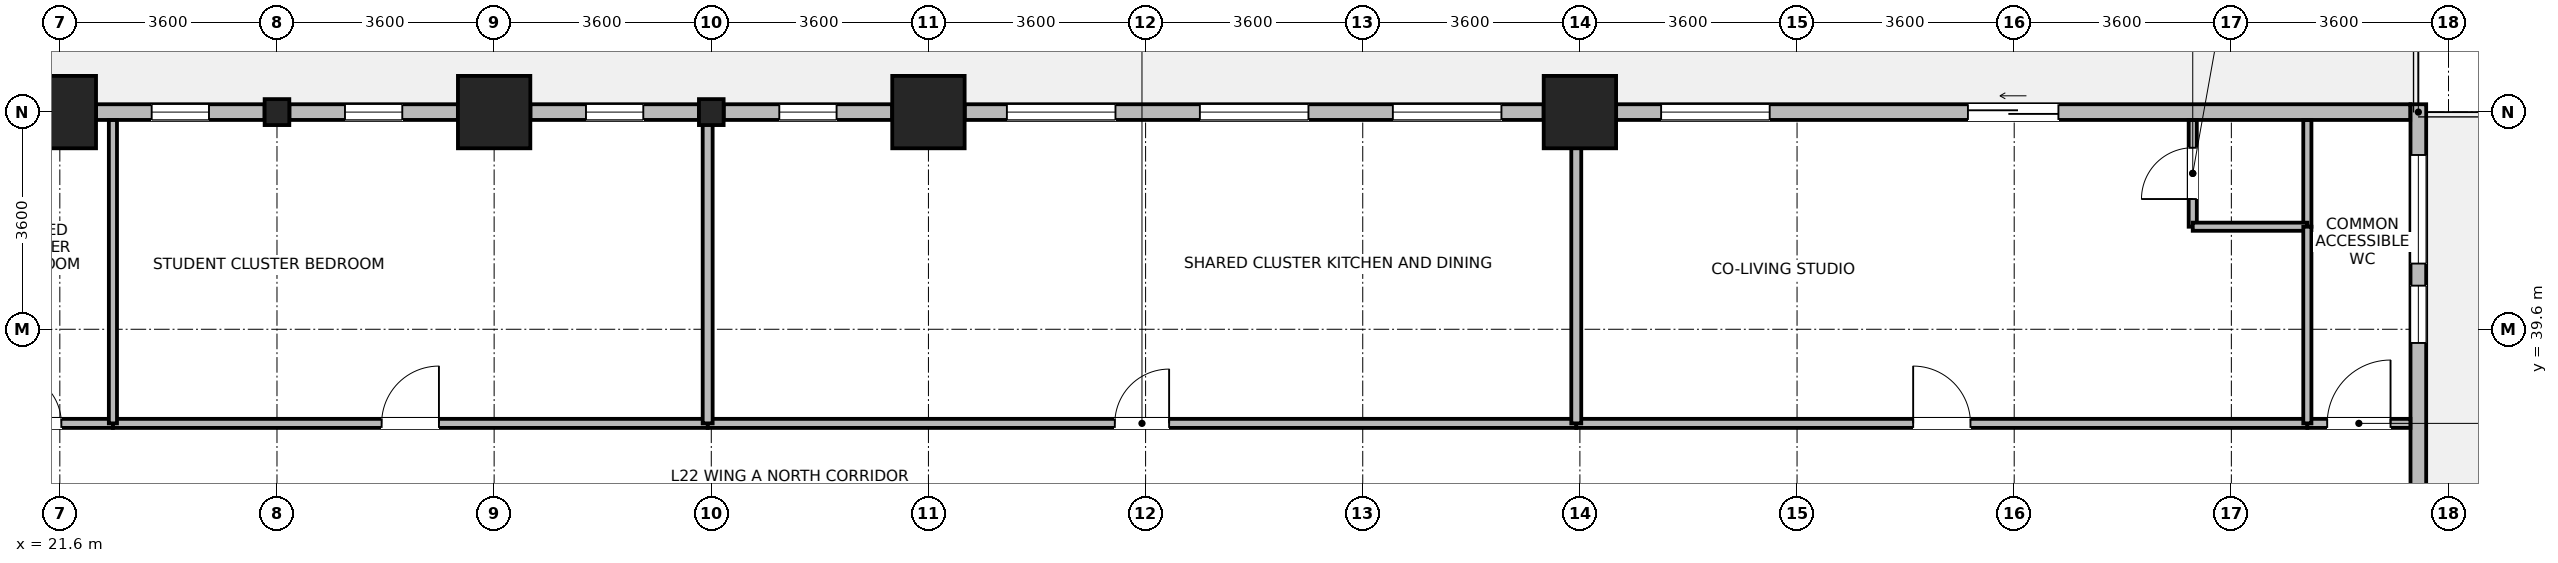
"""IFC4 building model, lengths in metres.
Left out: names, types, materials, properties, quantities, classifications, styles, units other than length and angle.
Written with IfcOpenShell. Run it as: python <this file> out.ifc"""

import sys

from ifc_helpers import new_model, si_unit, direction, frame, frame_2d, origin, origin_2d, place, context, subcontext, project, spatial, rectangle, i_section, extrude, source, transform, mapped, element, fill, save


model = new_model("IFC4")
c1 = context("Model", 3, precision=1e-05, world=origin(), true_north=direction((0.0, 1.0)))
c2 = subcontext(c1, "Body", "Model", "MODEL_VIEW")
j1 = project(units=[si_unit("LENGTHUNIT", "METRE"), si_unit("PLANEANGLEUNIT", "RADIAN")], contexts=[c1])
p1 = place(None, origin())
s1 = spatial("IfcSite", under=j1, at=p1, CompositionType="ELEMENT")
p2 = place(p1, origin())
s2 = spatial("IfcBuilding", under=s1, at=p2, CompositionType="ELEMENT")
p3 = place(p2, frame((0.0, 0.0, 89.7)))
s3 = spatial("IfcBuildingStorey", under=s2, at=p3, CompositionType="ELEMENT", Elevation=89.7)
m1 = source(origin(), c2, "Body", "SweptSolid", [
    extrude(rectangle(XDim=1.2, YDim=1.2, at=origin_2d()), origin(), (0.0, 0.0, 1.0), 3.7),
])
for number, where, z_axis, x_axis in (
    (1, (21.6, 43.2, 0.0), (0.0, 0.0, 1.0), (1.0, 0.0, 0.0)),
    (2, (28.8, 43.2, 0.0), (0.0, 0.0, 1.0), (1.0, 0.0, 0.0)),
    (3, (36.0, 43.2, 0.0), (0.0, 0.0, 1.0), (1.0, 0.0, 0.0)),
    (4, (46.8, 43.2, 0.0), (0.0, 0.0, 1.0), (1.0, 0.0, 0.0)),
):
    element("IfcColumn", number, at=place(p3, frame(where, z_axis=z_axis, x_axis=x_axis)), inside=s3, PredefinedType="COLUMN", context=c2, shape_type="MappedRepresentation", body=[
        mapped(m1, transform((0.0, 0.0, 0.0), x_axis=(1.0, 0.0, 0.0), y_axis=(0.0, 1.0, 0.0), z_axis=(0.0, 0.0, 1.0), scale=1.0)),
    ])
m2 = source(origin(), c2, "Body", "SweptSolid", [
    extrude(i_section(OverallWidth=0.409, OverallDepth=0.43, WebThickness=0.024, FlangeThickness=0.033, FilletRadius=0.015, at=origin_2d()), origin(), (0.0, 0.0, 1.0), 3.7),
])
for number, where, z_axis, x_axis in (
    (5, (25.2, 43.2, 0.0), (0.0, 0.0, 1.0), (1.0, 0.0, 0.0)),
    (6, (32.4, 43.2, 0.0), (0.0, 0.0, 1.0), (1.0, 0.0, 0.0)),
):
    element("IfcColumn", number, at=place(p3, frame(where, z_axis=z_axis, x_axis=x_axis)), inside=s3, PredefinedType="COLUMN", context=c2, shape_type="MappedRepresentation", body=[
        mapped(m2, transform((0.0, 0.0, 0.0), x_axis=(1.0, 0.0, 0.0), y_axis=(0.0, 1.0, 0.0), z_axis=(0.0, 0.0, 1.0), scale=1.0)),
    ])
p4 = place(p3, frame((60.7, 43.33, 0.0), z_axis=(0.0, 0.0, 1.0), x_axis=(0.0, -1.0, 0.0)))
e7 = element("IfcWall", 7, at=p4, inside=s3, PredefinedType="STANDARD", context=c2, shape_type="SweptSolid", body=[
    extrude(rectangle(XDim=6.964, YDim=0.26, at=frame_2d((3.482, 0.0))), origin(), (0.0, 0.0, 1.0), 3.43),
])
p5 = place(p4, frame((0.841, 0.0, 0.85)))
e8 = element("IfcOpeningElement", 8, at=p5, cuts=e7, PredefinedType="OPENING", context=c2, shape_type="SweptSolid", body=[
    extrude(rectangle(XDim=1.8, YDim=1.85, at=frame_2d((0.9, 0.925))), frame((0.0, 0.14, 0.0), z_axis=(0.0, -1.0, 0.0), x_axis=(1.0, 0.0, 0.0)), (0.0, 0.0, 1.0), 0.28),
])
p6 = place(p4, frame((3.007, 0.0, 0.85)))
e9 = element("IfcOpeningElement", 9, at=p6, cuts=e7, PredefinedType="OPENING", context=c2, shape_type="SweptSolid", body=[
    extrude(rectangle(XDim=0.95, YDim=1.75, at=frame_2d((0.475, 0.875))), frame((0.0, 0.14, 0.0), z_axis=(0.0, -1.0, 0.0), x_axis=(1.0, 0.0, 0.0)), (0.0, 0.0, 1.0), 0.28),
])
p7 = place(p3, frame((47.401, 43.2, 0.0), z_axis=(0.0, 0.0, 1.0), x_axis=(1.0, 0.0, 0.0)))
e10 = element("IfcWall", 10, at=p7, inside=s3, PredefinedType="STANDARD", context=c2, shape_type="SweptSolid", body=[
    extrude(rectangle(XDim=13.164, YDim=0.26, at=frame_2d((6.582, 0.0))), origin(), (0.0, 0.0, 1.0), 3.43),
])
p8 = place(p7, frame((5.832, 0.0, 0.0)))
e11 = element("IfcOpeningElement", 11, at=p8, cuts=e10, PredefinedType="OPENING", context=c2, shape_type="SweptSolid", body=[
    extrude(rectangle(XDim=1.5, YDim=2.15, at=frame_2d((0.75, 1.075))), frame((0.0, 0.14, 0.0), z_axis=(0.0, -1.0, 0.0), x_axis=(1.0, 0.0, 0.0)), (0.0, 0.0, 1.0), 0.28),
])
p9 = place(p7, frame((0.746, 0.0, 0.85)))
e12 = element("IfcOpeningElement", 12, at=p9, cuts=e10, PredefinedType="OPENING", context=c2, shape_type="SweptSolid", body=[
    extrude(rectangle(XDim=1.8, YDim=1.85, at=frame_2d((0.9, 0.925))), frame((0.0, 0.14, 0.0), z_axis=(0.0, -1.0, 0.0), x_axis=(1.0, 0.0, 0.0)), (0.0, 0.0, 1.0), 0.28),
])
p10 = place(p3, frame((36.601, 43.2, 0.0), z_axis=(0.0, 0.0, 1.0), x_axis=(1.0, 0.0, 0.0)))
e13 = element("IfcWall", 13, at=p10, inside=s3, PredefinedType="STANDARD", context=c2, shape_type="SweptSolid", body=[
    extrude(rectangle(XDim=9.598, YDim=0.26, at=frame_2d((4.799, 0.0))), origin(), (0.0, 0.0, 1.0), 2.93),
])
p11 = place(p10, frame((0.7, 0.0, 0.85)))
e14 = element("IfcOpeningElement", 14, at=p11, cuts=e13, PredefinedType="OPENING", context=c2, shape_type="SweptSolid", body=[
    extrude(rectangle(XDim=1.8, YDim=1.85, at=frame_2d((0.9, 0.925))), frame((0.0, 0.14, 0.0), z_axis=(0.0, -1.0, 0.0), x_axis=(1.0, 0.0, 0.0)), (0.0, 0.0, 1.0), 0.28),
])
p12 = place(p10, frame((3.899, 0.0, 0.85)))
e15 = element("IfcOpeningElement", 15, at=p12, cuts=e13, PredefinedType="OPENING", context=c2, shape_type="SweptSolid", body=[
    extrude(rectangle(XDim=1.8, YDim=1.85, at=frame_2d((0.9, 0.925))), frame((0.0, 0.14, 0.0), z_axis=(0.0, -1.0, 0.0), x_axis=(1.0, 0.0, 0.0)), (0.0, 0.0, 1.0), 0.28),
])
p13 = place(p10, frame((7.098, 0.0, 0.85)))
e16 = element("IfcOpeningElement", 16, at=p13, cuts=e13, PredefinedType="OPENING", context=c2, shape_type="SweptSolid", body=[
    extrude(rectangle(XDim=1.8, YDim=1.85, at=frame_2d((0.9, 0.925))), frame((0.0, 0.14, 0.0), z_axis=(0.0, -1.0, 0.0), x_axis=(1.0, 0.0, 0.0)), (0.0, 0.0, 1.0), 0.28),
])
p14 = place(p3, frame((32.605, 43.2, 0.0), z_axis=(0.0, 0.0, 1.0), x_axis=(1.0, 0.0, 0.0)))
e17 = element("IfcWall", 17, at=p14, inside=s3, PredefinedType="STANDARD", context=c2, shape_type="SweptSolid", body=[
    extrude(rectangle(XDim=2.793, YDim=0.26, at=frame_2d((1.397, 0.0))), origin(), (0.0, 0.0, 1.0), 2.93),
])
p15 = place(p14, frame((0.922, 0.0, 0.85)))
e18 = element("IfcOpeningElement", 18, at=p15, cuts=e17, PredefinedType="OPENING", context=c2, shape_type="SweptSolid", body=[
    extrude(rectangle(XDim=0.95, YDim=1.75, at=frame_2d((0.475, 0.875))), frame((0.0, 0.14, 0.0), z_axis=(0.0, -1.0, 0.0), x_axis=(1.0, 0.0, 0.0)), (0.0, 0.0, 1.0), 0.28),
])
p16 = place(p3, frame((29.401, 43.2, 0.0), z_axis=(0.0, 0.0, 1.0), x_axis=(1.0, 0.0, 0.0)))
e19 = element("IfcWall", 19, at=p16, inside=s3, PredefinedType="STANDARD", context=c2, shape_type="SweptSolid", body=[
    extrude(rectangle(XDim=2.794, YDim=0.26, at=frame_2d((1.397, 0.0))), origin(), (0.0, 0.0, 1.0), 2.93),
])
p17 = place(p16, frame((0.922, 0.0, 0.85)))
e20 = element("IfcOpeningElement", 20, at=p17, cuts=e19, PredefinedType="OPENING", context=c2, shape_type="SweptSolid", body=[
    extrude(rectangle(XDim=0.95, YDim=1.75, at=frame_2d((0.475, 0.875))), frame((0.0, 0.14, 0.0), z_axis=(0.0, -1.0, 0.0), x_axis=(1.0, 0.0, 0.0)), (0.0, 0.0, 1.0), 0.28),
])
p18 = place(p3, frame((25.406, 43.2, 0.0), z_axis=(0.0, 0.0, 1.0), x_axis=(1.0, 0.0, 0.0)))
e21 = element("IfcWall", 21, at=p18, inside=s3, PredefinedType="STANDARD", context=c2, shape_type="SweptSolid", body=[
    extrude(rectangle(XDim=2.793, YDim=0.26, at=frame_2d((1.397, 0.0))), origin(), (0.0, 0.0, 1.0), 2.93),
])
p19 = place(p18, frame((0.922, 0.0, 0.85)))
e22 = element("IfcOpeningElement", 22, at=p19, cuts=e21, PredefinedType="OPENING", context=c2, shape_type="SweptSolid", body=[
    extrude(rectangle(XDim=0.95, YDim=1.75, at=frame_2d((0.475, 0.875))), frame((0.0, 0.14, 0.0), z_axis=(0.0, -1.0, 0.0), x_axis=(1.0, 0.0, 0.0)), (0.0, 0.0, 1.0), 0.28),
])
p20 = place(p3, frame((22.201, 43.2, 0.0), z_axis=(0.0, 0.0, 1.0), x_axis=(1.0, 0.0, 0.0)))
e23 = element("IfcWall", 23, at=p20, inside=s3, PredefinedType="STANDARD", context=c2, shape_type="SweptSolid", body=[
    extrude(rectangle(XDim=2.793, YDim=0.26, at=frame_2d((1.397, 0.0))), origin(), (0.0, 0.0, 1.0), 2.93),
])
p21 = place(p20, frame((0.922, 0.0, 0.85)))
e24 = element("IfcOpeningElement", 24, at=p21, cuts=e23, PredefinedType="OPENING", context=c2, shape_type="SweptSolid", body=[
    extrude(rectangle(XDim=0.95, YDim=1.75, at=frame_2d((0.475, 0.875))), frame((0.0, 0.14, 0.0), z_axis=(0.0, -1.0, 0.0), x_axis=(1.0, 0.0, 0.0)), (0.0, 0.0, 1.0), 0.28),
])
p22 = place(p3, frame((56.96, 41.3, 0.0), z_axis=(0.0, 0.0, 1.0), x_axis=(0.0, 1.0, 0.0)))
e25 = element("IfcWall", 25, at=p22, inside=s3, PredefinedType="PARTITIONING", context=c2, shape_type="SweptSolid", body=[
    extrude(rectangle(XDim=1.768, YDim=0.135, at=frame_2d((0.884, 0.0))), origin(), (0.0, 0.0, 1.0), 3.43),
])
p23 = place(p22, frame((0.459, 0.0, 0.0)))
e26 = element("IfcOpeningElement", 26, at=p23, cuts=e25, PredefinedType="OPENING", context=c2, shape_type="SweptSolid", body=[
    extrude(rectangle(XDim=0.85, YDim=2.04, at=frame_2d((0.425, 1.02))), frame((0.0, 0.078, 0.0), z_axis=(0.0, -1.0, 0.0), x_axis=(1.0, 0.0, 0.0)), (0.0, 0.0, 1.0), 0.155),
])
p24 = place(p3, frame((58.86, 41.3, 0.0), z_axis=(0.0, 0.0, 1.0), x_axis=(0.0, 1.0, 0.0)))
e27 = element("IfcWall", 27, at=p24, inside=s3, PredefinedType="PARTITIONING", context=c2, shape_type="SweptSolid", body=[
    extrude(rectangle(XDim=1.768, YDim=0.135, at=frame_2d((0.884, 0.0))), origin(), (0.0, 0.0, 1.0), 3.43),
])
p25 = place(p3, frame((56.96, 41.3, 0.0), z_axis=(0.0, 0.0, 1.0), x_axis=(1.0, 0.0, 0.0)))
e28 = element("IfcWall", 28, at=p25, inside=s3, PredefinedType="PARTITIONING", context=c2, shape_type="SweptSolid", body=[
    extrude(rectangle(XDim=1.9, YDim=0.135, at=frame_2d((0.95, 0.0))), origin(), (0.0, 0.0, 1.0), 3.43),
])
p26 = place(p3, frame((32.34, 38.04, 0.0), z_axis=(0.0, 0.0, 1.0), x_axis=(1.0, 0.0, 0.0)))
e29 = element("IfcWall", 29, at=p26, inside=s3, PredefinedType="PARTITIONING", context=c2, shape_type="SweptSolid", body=[
    extrude(rectangle(XDim=14.4, YDim=0.15, at=frame_2d((7.2, 0.0))), origin(), (0.0, 0.0, 1.0), 3.43),
])
p27 = place(p26, frame((6.75, 0.0, 0.0)))
e30 = element("IfcOpeningElement", 30, at=p27, cuts=e29, PredefinedType="OPENING", context=c2, shape_type="SweptSolid", body=[
    extrude(rectangle(XDim=0.9, YDim=2.08, at=frame_2d((0.45, 1.04))), frame((0.0, 0.085, 0.0), z_axis=(0.0, -1.0, 0.0), x_axis=(1.0, 0.0, 0.0)), (0.0, 0.0, 1.0), 0.17),
])
p28 = place(p3, frame((46.74, 38.04, 0.0), z_axis=(0.0, 0.0, 1.0), x_axis=(1.0, 0.0, 0.0)))
e31 = element("IfcWall", 31, at=p28, inside=s3, PredefinedType="PARTITIONING", context=c2, shape_type="SweptSolid", body=[
    extrude(rectangle(XDim=12.12, YDim=0.15, at=frame_2d((6.06, 0.0))), origin(), (0.0, 0.0, 1.0), 3.43),
])
p29 = place(p28, frame((5.585, 0.0, 0.0)))
e32 = element("IfcOpeningElement", 32, at=p29, cuts=e31, PredefinedType="OPENING", context=c2, shape_type="SweptSolid", body=[
    extrude(rectangle(XDim=0.95, YDim=2.1, at=frame_2d((0.475, 1.05))), frame((0.0, 0.085, 0.0), z_axis=(0.0, -1.0, 0.0), x_axis=(1.0, 0.0, 0.0)), (0.0, 0.0, 1.0), 0.17),
])
p30 = place(p3, frame((22.48, 38.04, 0.0), z_axis=(0.0, 0.0, 1.0), x_axis=(1.0, 0.0, 0.0)))
e33 = element("IfcWall", 33, at=p30, inside=s3, PredefinedType="PARTITIONING", context=c2, shape_type="SweptSolid", body=[
    extrude(rectangle(XDim=9.86, YDim=0.15, at=frame_2d((4.93, 0.0))), origin(), (0.0, 0.0, 1.0), 3.43),
])
p31 = place(p30, frame((4.455, 0.0, 0.0)))
e34 = element("IfcOpeningElement", 34, at=p31, cuts=e33, PredefinedType="OPENING", context=c2, shape_type="SweptSolid", body=[
    extrude(rectangle(XDim=0.95, YDim=2.1, at=frame_2d((0.475, 1.05))), frame((0.0, 0.085, 0.0), z_axis=(0.0, -1.0, 0.0), x_axis=(1.0, 0.0, 0.0)), (0.0, 0.0, 1.0), 0.17),
])
p32 = place(p3, frame((19.92, 38.04, 0.0), z_axis=(0.0, 0.0, 1.0), x_axis=(1.0, 0.0, 0.0)))
e35 = element("IfcWall", 35, at=p32, inside=s3, PredefinedType="PARTITIONING", context=c2, shape_type="SweptSolid", body=[
    extrude(rectangle(XDim=2.56, YDim=0.15, at=frame_2d((1.28, 0.0))), origin(), (0.0, 0.0, 1.0), 3.43),
])
p33 = place(p32, frame((0.855, 0.0, 0.0)))
e36 = element("IfcOpeningElement", 36, at=p33, cuts=e35, PredefinedType="OPENING", context=c2, shape_type="SweptSolid", body=[
    extrude(rectangle(XDim=0.85, YDim=2.04, at=frame_2d((0.425, 1.02))), frame((0.0, 0.085, 0.0), z_axis=(0.0, -1.0, 0.0), x_axis=(1.0, 0.0, 0.0)), (0.0, 0.0, 1.0), 0.17),
])
p34 = place(p3, frame((58.86, 38.04, 0.0), z_axis=(0.0, 0.0, 1.0), x_axis=(1.0, 0.0, 0.0)))
e37 = element("IfcWall", 37, at=p34, inside=s3, PredefinedType="PARTITIONING", context=c2, shape_type="SweptSolid", body=[
    extrude(rectangle(XDim=1.708, YDim=0.15, at=frame_2d((0.854, 0.0))), origin(), (0.0, 0.0, 1.0), 3.43),
])
p35 = place(p34, frame((0.329, 0.0, 0.0)))
e38 = element("IfcOpeningElement", 38, at=p35, cuts=e37, PredefinedType="OPENING", context=c2, shape_type="SweptSolid", body=[
    extrude(rectangle(XDim=1.05, YDim=2.12, at=frame_2d((0.525, 1.06))), frame((0.0, 0.085, 0.0), z_axis=(0.0, -1.0, 0.0), x_axis=(1.0, 0.0, 0.0)), (0.0, 0.0, 1.0), 0.17),
])
p36 = place(p3, frame((22.48, 38.04, 0.0), z_axis=(0.0, 0.0, 1.0), x_axis=(0.0, 1.0, 0.0)))
e39 = element("IfcWall", 39, at=p36, inside=s3, PredefinedType="PARTITIONING", context=c2, shape_type="SweptSolid", body=[
    extrude(rectangle(XDim=5.028, YDim=0.135, at=frame_2d((2.514, 0.0))), origin(), (0.0, 0.0, 1.0), 3.43),
])
p37 = place(p3, frame((32.34, 38.04, 0.0), z_axis=(0.0, 0.0, 1.0), x_axis=(0.0, 1.0, 0.0)))
e40 = element("IfcWall", 40, at=p37, inside=s3, PredefinedType="PARTITIONING", context=c2, shape_type="SweptSolid", body=[
    extrude(rectangle(XDim=5.028, YDim=0.165, at=frame_2d((2.514, 0.0))), origin(), (0.0, 0.0, 1.0), 3.07),
])
p38 = place(p3, frame((46.74, 38.04, 0.0), z_axis=(0.0, 0.0, 1.0), x_axis=(0.0, 1.0, 0.0)))
e41 = element("IfcWall", 41, at=p38, inside=s3, PredefinedType="PARTITIONING", context=c2, shape_type="SweptSolid", body=[
    extrude(rectangle(XDim=5.028, YDim=0.165, at=frame_2d((2.514, 0.0))), origin(), (0.0, 0.0, 1.0), 2.93),
])
p39 = place(p3, frame((58.86, 38.04, 0.0), z_axis=(0.0, 0.0, 1.0), x_axis=(0.0, 1.0, 0.0)))
e42 = element("IfcWall", 42, at=p39, inside=s3, PredefinedType="PARTITIONING", context=c2, shape_type="SweptSolid", body=[
    extrude(rectangle(XDim=3.26, YDim=0.135, at=frame_2d((1.63, 0.0))), origin(), (0.0, 0.0, 1.0), 3.43),
])
p40 = place(p5, origin())
e43 = element("IfcWindow", 43, at=p40, inside=s3, PartitioningType="SINGLE_PANEL", PredefinedType="WINDOW", context=c2, shape_type="SweptSolid", body=[
    extrude(rectangle(XDim=1.8, YDim=1.85, at=frame_2d((0.9, 0.925))), frame((0.0, 0.03, 0.0), z_axis=(0.0, -1.0, 0.0), x_axis=(1.0, 0.0, 0.0)), (0.0, 0.0, 1.0), 0.06),
])
fill(e8, e43)
p41 = place(p6, origin())
e44 = element("IfcWindow", 44, at=p41, inside=s3, PartitioningType="SINGLE_PANEL", PredefinedType="WINDOW", context=c2, shape_type="SweptSolid", body=[
    extrude(rectangle(XDim=0.95, YDim=1.75, at=frame_2d((0.475, 0.875))), frame((0.0, 0.03, 0.0), z_axis=(0.0, -1.0, 0.0), x_axis=(1.0, 0.0, 0.0)), (0.0, 0.0, 1.0), 0.06),
])
fill(e9, e44)
p42 = place(p8, origin())
e45 = element("IfcDoor", 45, at=p42, inside=s3, OperationType="SLIDING_TO_LEFT", PredefinedType="DOOR", context=c2, shape_type="SweptSolid", body=[
    extrude(rectangle(XDim=1.5, YDim=2.15, at=frame_2d((0.75, 1.075))), frame((0.0, 0.025, 0.0), z_axis=(0.0, -1.0, 0.0), x_axis=(1.0, 0.0, 0.0)), (0.0, 0.0, 1.0), 0.05),
])
fill(e11, e45)
p43 = place(p9, origin())
e46 = element("IfcWindow", 46, at=p43, inside=s3, PartitioningType="SINGLE_PANEL", PredefinedType="WINDOW", context=c2, shape_type="SweptSolid", body=[
    extrude(rectangle(XDim=1.8, YDim=1.85, at=frame_2d((0.9, 0.925))), frame((0.0, 0.03, 0.0), z_axis=(0.0, -1.0, 0.0), x_axis=(1.0, 0.0, 0.0)), (0.0, 0.0, 1.0), 0.06),
])
fill(e12, e46)
p44 = place(p11, origin())
e47 = element("IfcWindow", 47, at=p44, inside=s3, PartitioningType="SINGLE_PANEL", PredefinedType="WINDOW", context=c2, shape_type="SweptSolid", body=[
    extrude(rectangle(XDim=1.8, YDim=1.85, at=frame_2d((0.9, 0.925))), frame((0.0, 0.03, 0.0), z_axis=(0.0, -1.0, 0.0), x_axis=(1.0, 0.0, 0.0)), (0.0, 0.0, 1.0), 0.06),
])
fill(e14, e47)
p45 = place(p12, origin())
e48 = element("IfcWindow", 48, at=p45, inside=s3, PartitioningType="SINGLE_PANEL", PredefinedType="WINDOW", context=c2, shape_type="SweptSolid", body=[
    extrude(rectangle(XDim=1.8, YDim=1.85, at=frame_2d((0.9, 0.925))), frame((0.0, 0.03, 0.0), z_axis=(0.0, -1.0, 0.0), x_axis=(1.0, 0.0, 0.0)), (0.0, 0.0, 1.0), 0.06),
])
fill(e15, e48)
p46 = place(p13, origin())
e49 = element("IfcWindow", 49, at=p46, inside=s3, PartitioningType="SINGLE_PANEL", PredefinedType="WINDOW", context=c2, shape_type="SweptSolid", body=[
    extrude(rectangle(XDim=1.8, YDim=1.85, at=frame_2d((0.9, 0.925))), frame((0.0, 0.03, 0.0), z_axis=(0.0, -1.0, 0.0), x_axis=(1.0, 0.0, 0.0)), (0.0, 0.0, 1.0), 0.06),
])
fill(e16, e49)
p47 = place(p15, origin())
e50 = element("IfcWindow", 50, at=p47, inside=s3, PartitioningType="SINGLE_PANEL", PredefinedType="WINDOW", context=c2, shape_type="SweptSolid", body=[
    extrude(rectangle(XDim=0.95, YDim=1.75, at=frame_2d((0.475, 0.875))), frame((0.0, 0.03, 0.0), z_axis=(0.0, -1.0, 0.0), x_axis=(1.0, 0.0, 0.0)), (0.0, 0.0, 1.0), 0.06),
])
fill(e18, e50)
p48 = place(p17, origin())
e51 = element("IfcWindow", 51, at=p48, inside=s3, PartitioningType="SINGLE_PANEL", PredefinedType="WINDOW", context=c2, shape_type="SweptSolid", body=[
    extrude(rectangle(XDim=0.95, YDim=1.75, at=frame_2d((0.475, 0.875))), frame((0.0, 0.03, 0.0), z_axis=(0.0, -1.0, 0.0), x_axis=(1.0, 0.0, 0.0)), (0.0, 0.0, 1.0), 0.06),
])
fill(e20, e51)
p49 = place(p19, origin())
e52 = element("IfcWindow", 52, at=p49, inside=s3, PartitioningType="SINGLE_PANEL", PredefinedType="WINDOW", context=c2, shape_type="SweptSolid", body=[
    extrude(rectangle(XDim=0.95, YDim=1.75, at=frame_2d((0.475, 0.875))), frame((0.0, 0.03, 0.0), z_axis=(0.0, -1.0, 0.0), x_axis=(1.0, 0.0, 0.0)), (0.0, 0.0, 1.0), 0.06),
])
fill(e22, e52)
p50 = place(p21, origin())
e53 = element("IfcWindow", 53, at=p50, inside=s3, PartitioningType="SINGLE_PANEL", PredefinedType="WINDOW", context=c2, shape_type="SweptSolid", body=[
    extrude(rectangle(XDim=0.95, YDim=1.75, at=frame_2d((0.475, 0.875))), frame((0.0, 0.03, 0.0), z_axis=(0.0, -1.0, 0.0), x_axis=(1.0, 0.0, 0.0)), (0.0, 0.0, 1.0), 0.06),
])
fill(e24, e53)
p51 = place(p23, origin())
e54 = element("IfcDoor", 54, at=p51, inside=s3, OperationType="SINGLE_SWING_LEFT", PredefinedType="DOOR", context=c2, shape_type="SweptSolid", body=[
    extrude(rectangle(XDim=0.85, YDim=2.04, at=frame_2d((0.425, 1.02))), frame((0.0, 0.025, 0.0), z_axis=(0.0, -1.0, 0.0), x_axis=(1.0, 0.0, 0.0)), (0.0, 0.0, 1.0), 0.05),
])
fill(e26, e54)
p52 = place(p27, origin())
e55 = element("IfcDoor", 55, at=p52, inside=s3, OperationType="SINGLE_SWING_RIGHT", PredefinedType="DOOR", context=c2, shape_type="SweptSolid", body=[
    extrude(rectangle(XDim=0.9, YDim=2.08, at=frame_2d((0.45, 1.04))), frame((0.0, 0.025, 0.0), z_axis=(0.0, -1.0, 0.0), x_axis=(1.0, 0.0, 0.0)), (0.0, 0.0, 1.0), 0.05),
])
fill(e30, e55)
p53 = place(p29, origin())
e56 = element("IfcDoor", 56, at=p53, inside=s3, OperationType="SINGLE_SWING_LEFT", PredefinedType="DOOR", context=c2, shape_type="SweptSolid", body=[
    extrude(rectangle(XDim=0.95, YDim=2.1, at=frame_2d((0.475, 1.05))), frame((0.0, 0.025, 0.0), z_axis=(0.0, -1.0, 0.0), x_axis=(1.0, 0.0, 0.0)), (0.0, 0.0, 1.0), 0.05),
])
fill(e32, e56)
p54 = place(p31, origin())
e57 = element("IfcDoor", 57, at=p54, inside=s3, OperationType="SINGLE_SWING_RIGHT", PredefinedType="DOOR", context=c2, shape_type="SweptSolid", body=[
    extrude(rectangle(XDim=0.95, YDim=2.1, at=frame_2d((0.475, 1.05))), frame((0.0, 0.025, 0.0), z_axis=(0.0, -1.0, 0.0), x_axis=(1.0, 0.0, 0.0)), (0.0, 0.0, 1.0), 0.05),
])
fill(e34, e57)
p55 = place(p33, origin())
e58 = element("IfcDoor", 58, at=p55, inside=s3, OperationType="SINGLE_SWING_LEFT", PredefinedType="DOOR", context=c2, shape_type="SweptSolid", body=[
    extrude(rectangle(XDim=0.85, YDim=2.04, at=frame_2d((0.425, 1.02))), frame((0.0, 0.025, 0.0), z_axis=(0.0, -1.0, 0.0), x_axis=(1.0, 0.0, 0.0)), (0.0, 0.0, 1.0), 0.05),
])
fill(e36, e58)
p56 = place(p35, origin())
e59 = element("IfcDoor", 59, at=p56, inside=s3, OperationType="SINGLE_SWING_RIGHT", PredefinedType="DOOR", context=c2, shape_type="SweptSolid", body=[
    extrude(rectangle(XDim=1.05, YDim=2.12, at=frame_2d((0.525, 1.06))), frame((0.0, 0.025, 0.0), z_axis=(0.0, -1.0, 0.0), x_axis=(1.0, 0.0, 0.0)), (0.0, 0.0, 1.0), 0.05),
])
fill(e38, e59)
save(model, sys.argv[1])
